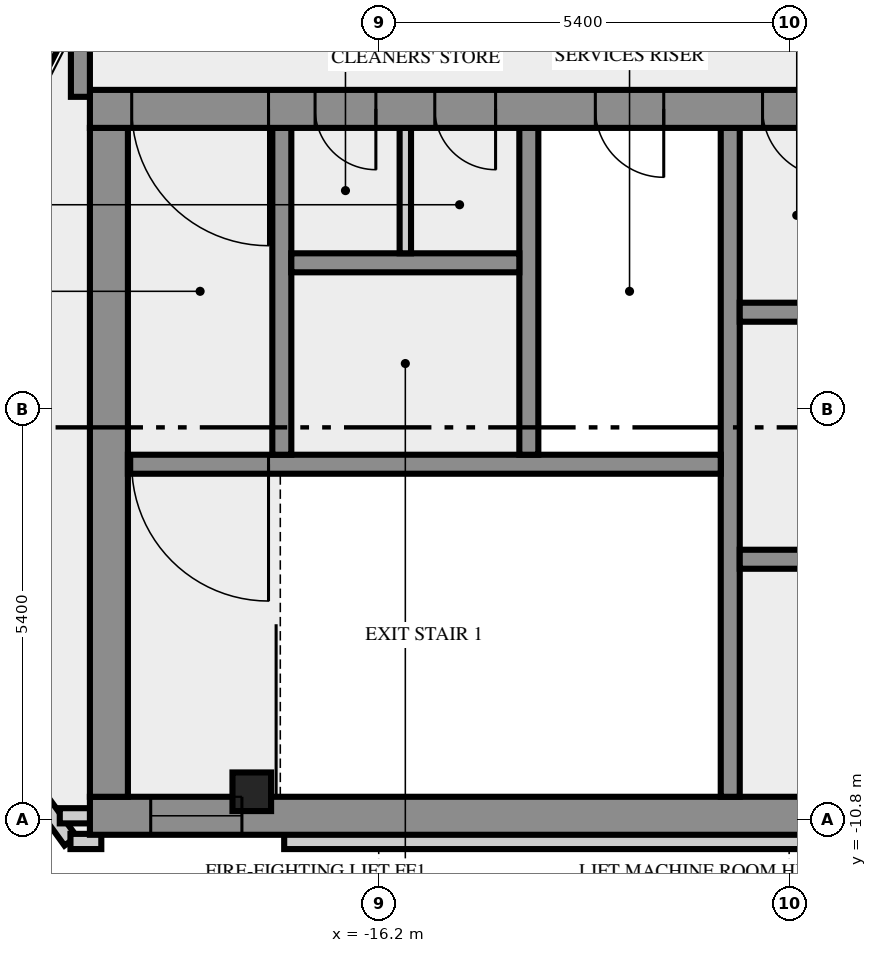
"""IFC4 building model, lengths in metres.
Left out: names, types, materials, properties, quantities, classifications, styles, units other than length and angle.
Written with IfcOpenShell. Run it as: python <this file> out.ifc"""

import sys

from ifc_helpers import new_model, si_unit, direction, frame, frame_2d, origin, origin_2d, place, context, subcontext, project, spatial, rectangle, hollow_rectangle, extrude, element, fill, save


model = new_model("IFC4")
c1 = context("Model", 3, precision=1e-05, world=origin(), true_north=direction((0.0, 1.0)))
c2 = subcontext(c1, "Body", "Model", "MODEL_VIEW")
j1 = project(units=[si_unit("LENGTHUNIT", "METRE"), si_unit("PLANEANGLEUNIT", "RADIAN")], contexts=[c1])
p1 = place(None, origin())
s1 = spatial("IfcSite", under=j1, at=p1, CompositionType="ELEMENT")
p2 = place(p1, origin())
s2 = spatial("IfcBuilding", under=s1, at=p2, CompositionType="ELEMENT")
p3 = place(p2, frame((0.0, 0.0, 363.0)))
s3 = spatial("IfcBuildingStorey", under=s2, at=p3, CompositionType="ELEMENT", Elevation=363.0)
p4 = place(p3, frame((-17.87, -10.434, 0.0), z_axis=(0.0, 0.0, 1.0), x_axis=(1.0, 0.0, 0.0)))
e1 = element("IfcColumn", 1, at=p4, inside=s3, PredefinedType="COLUMN", context=c2, shape_type="SweptSolid", body=[
    extrude(hollow_rectangle(XDim=0.508, YDim=0.508, WallThickness=0.016, at=origin_2d()), origin(), (0.0, 0.0, 1.0), 4.75),
])
p5 = place(p3, frame((-14.748, 10.692, 0.0), z_axis=(0.0, 0.0, 1.0), x_axis=(-0.453989383659, -0.891007092859, 0.0)))
e2 = element("IfcWall", 2, at=p5, inside=s3, PredefinedType="SOLIDWALL", context=c2, shape_type="SweptSolid", body=[
    extrude(rectangle(XDim=20.988, YDim=0.2, at=frame_2d((10.494, 0.0))), origin(), (0.0, 0.0, 1.0), 4.75),
])
p6 = place(p5, frame((1.06, 0.0, 1.0)))
e3 = element("IfcOpeningElement", 3, at=p6, cuts=e2, PredefinedType="OPENING", context=c2, shape_type="SweptSolid", body=[
    extrude(rectangle(XDim=3.0, YDim=2.8, at=frame_2d((1.5, 1.4))), frame((0.0, 0.11, 0.0), z_axis=(0.0, -1.0, 0.0), x_axis=(1.0, 0.0, 0.0)), (0.0, 0.0, 1.0), 0.22),
])
p7 = place(p5, frame((6.428, 0.0, 1.0)))
e4 = element("IfcOpeningElement", 4, at=p7, cuts=e2, PredefinedType="OPENING", context=c2, shape_type="SweptSolid", body=[
    extrude(rectangle(XDim=3.0, YDim=2.8, at=frame_2d((1.5, 1.4))), frame((0.0, 0.11, 0.0), z_axis=(0.0, -1.0, 0.0), x_axis=(1.0, 0.0, 0.0)), (0.0, 0.0, 1.0), 0.22),
])
p8 = place(p5, frame((12.044, 0.0, 1.0)))
e5 = element("IfcOpeningElement", 5, at=p8, cuts=e2, PredefinedType="OPENING", context=c2, shape_type="SweptSolid", body=[
    extrude(rectangle(XDim=3.0, YDim=2.8, at=frame_2d((1.5, 1.4))), frame((0.0, 0.11, 0.0), z_axis=(0.0, -1.0, 0.0), x_axis=(1.0, 0.0, 0.0)), (0.0, 0.0, 1.0), 0.22),
])
p9 = place(p5, frame((17.17, 0.0, 1.0)))
e6 = element("IfcOpeningElement", 6, at=p9, cuts=e2, PredefinedType="OPENING", context=c2, shape_type="SweptSolid", body=[
    extrude(rectangle(XDim=3.0, YDim=2.8, at=frame_2d((1.5, 1.4))), frame((0.0, 0.11, 0.0), z_axis=(0.0, -1.0, 0.0), x_axis=(1.0, 0.0, 0.0)), (0.0, 0.0, 1.0), 0.22),
])
p10 = place(p3, frame((-21.833, -8.909, 0.0), z_axis=(0.0, 0.0, 1.0), x_axis=(0.587766567315, -0.809030569476, 0.0)))
e7 = element("IfcWall", 7, at=p10, inside=s3, PredefinedType="SOLIDWALL", context=c2, shape_type="SweptSolid", body=[
    extrude(rectangle(XDim=2.688, YDim=0.2, at=frame_2d((1.344, 0.0))), origin(), (0.0, 0.0, 1.0), 4.75),
])
p11 = place(p3, frame((-20.256, -11.088, 0.0), z_axis=(0.0, 0.0, 1.0), x_axis=(1.0, 0.0, 0.0)))
e8 = element("IfcWall", 8, at=p11, inside=s3, PredefinedType="SOLIDWALL", context=c2, shape_type="SweptSolid", body=[
    extrude(rectangle(XDim=0.406, YDim=0.2, at=frame_2d((0.203, 0.0))), origin(), (0.0, 0.0, 1.0), 4.75),
])
p12 = place(p3, frame((-17.444, -11.088, 0.0), z_axis=(0.0, 0.0, 1.0), x_axis=(1.0, 0.0, 0.0)))
e9 = element("IfcWall", 9, at=p12, inside=s3, PredefinedType="SOLIDWALL", context=c2, shape_type="SweptSolid", body=[
    extrude(rectangle(XDim=34.888, YDim=0.2, at=frame_2d((17.444, 0.0))), origin(), (0.0, 0.0, 1.0), 4.75),
])
p13 = place(p3, frame((-19.98, -10.75, 0.0), z_axis=(0.0, 0.0, 1.0), x_axis=(-1.0, 0.0, 0.0)))
e10 = element("IfcWall", 10, at=p13, inside=s3, PredefinedType="SOLIDWALL", context=c2, shape_type="SweptSolid", body=[
    extrude(rectangle(XDim=0.417, YDim=0.2, at=frame_2d((0.208, 0.0))), origin(), (0.0, 0.0, 1.0), 4.75),
])
p14 = place(p3, frame((-20.0, -10.75, 0.0), z_axis=(0.0, 0.0, 1.0), x_axis=(1.0, 0.0, 0.0)))
e11 = element("IfcWall", 11, at=p14, inside=s3, PredefinedType="SHEAR", context=c2, shape_type="SweptSolid", body=[
    extrude(rectangle(XDim=40.0, YDim=0.5, at=frame_2d((20.0, 0.0))), origin(), (0.0, 0.0, 1.0), 4.75),
])
p15 = place(p14, frame((0.8, 0.0, 1.0)))
e12 = element("IfcOpeningElement", 12, at=p15, cuts=e11, PredefinedType="OPENING", context=c2, shape_type="SweptSolid", body=[
    extrude(rectangle(XDim=1.2, YDim=1.2, at=frame_2d((0.6, 0.6))), frame((0.0, 0.26, 0.0), z_axis=(0.0, -1.0, 0.0), x_axis=(1.0, 0.0, 0.0)), (0.0, 0.0, 1.0), 0.52),
])
p16 = place(p14, frame((38.0, 0.0, 1.0)))
e13 = element("IfcOpeningElement", 13, at=p16, cuts=e11, PredefinedType="OPENING", context=c2, shape_type="SweptSolid", body=[
    extrude(rectangle(XDim=1.2, YDim=1.2, at=frame_2d((0.6, 0.6))), frame((0.0, 0.26, 0.0), z_axis=(0.0, -1.0, 0.0), x_axis=(1.0, 0.0, 0.0)), (0.0, 0.0, 1.0), 0.52),
])
p17 = place(p3, frame((-19.75, -10.5, 0.0), z_axis=(0.0, 0.0, 1.0), x_axis=(0.0, 1.0, 0.0)))
e14 = element("IfcWall", 14, at=p17, inside=s3, PredefinedType="SHEAR", context=c2, shape_type="SweptSolid", body=[
    extrude(rectangle(XDim=8.8, YDim=0.5, at=frame_2d((4.4, 0.0))), origin(), (0.0, 0.0, 1.0), 4.75),
])
p18 = place(p3, frame((-11.575, -10.5, 0.0), z_axis=(0.0, 0.0, 1.0), x_axis=(0.0, 1.0, 0.0)))
e15 = element("IfcWall", 15, at=p18, inside=s3, PredefinedType="SHEAR", context=c2, shape_type="SweptSolid", body=[
    extrude(rectangle(XDim=8.8, YDim=0.25, at=frame_2d((4.4, 0.0))), origin(), (0.0, 0.0, 1.0), 4.75),
])
p19 = place(p3, frame((-6.3, -7.375, 0.0), z_axis=(0.0, 0.0, 1.0), x_axis=(-1.0, 0.0, 0.0)))
e16 = element("IfcWall", 16, at=p19, inside=s3, PredefinedType="SHEAR", context=c2, shape_type="SweptSolid", body=[
    extrude(rectangle(XDim=5.15, YDim=0.25, at=frame_2d((2.575, 0.0))), origin(), (0.0, 0.0, 1.0), 4.75),
])
p20 = place(p19, frame((2.95, 0.0, 0.0)))
e17 = element("IfcOpeningElement", 17, at=p20, cuts=e16, PredefinedType="OPENING", context=c2, shape_type="SweptSolid", body=[
    extrude(rectangle(XDim=0.9, YDim=2.1, at=frame_2d((0.45, 1.05))), frame((0.0, 0.135, 0.0), z_axis=(0.0, -1.0, 0.0), x_axis=(1.0, 0.0, 0.0)), (0.0, 0.0, 1.0), 0.27),
])
p21 = place(p19, frame((0.25, 0.0, 0.0)))
e18 = element("IfcOpeningElement", 18, at=p21, cuts=e16, PredefinedType="OPENING", context=c2, shape_type="SweptSolid", body=[
    extrude(rectangle(XDim=0.9, YDim=2.1, at=frame_2d((0.45, 1.05))), frame((0.0, 0.135, 0.0), z_axis=(0.0, -1.0, 0.0), x_axis=(1.0, 0.0, 0.0)), (0.0, 0.0, 1.0), 0.27),
])
p22 = place(p3, frame((-11.7, -6.125, 0.0), z_axis=(0.0, 0.0, 1.0), x_axis=(-1.0, 0.0, 0.0)))
e19 = element("IfcWall", 19, at=p22, inside=s3, PredefinedType="SHEAR", context=c2, shape_type="SweptSolid", body=[
    extrude(rectangle(XDim=7.8, YDim=0.25, at=frame_2d((3.9, 0.0))), origin(), (0.0, 0.0, 1.0), 4.75),
])
p23 = place(p22, frame((5.95, 0.0, 0.0)))
e20 = element("IfcOpeningElement", 20, at=p23, cuts=e19, PredefinedType="OPENING", context=c2, shape_type="SweptSolid", body=[
    extrude(rectangle(XDim=1.8, YDim=2.1, at=frame_2d((0.9, 1.05))), frame((0.0, 0.135, 0.0), z_axis=(0.0, -1.0, 0.0), x_axis=(1.0, 0.0, 0.0)), (0.0, 0.0, 1.0), 0.27),
])
for number, where, z_axis, x_axis in (
    (21, (-17.475, -6.0, 0.0), (0.0, 0.0, 1.0), (0.0, 1.0, 0.0)),
    (22, (-14.225, -6.0, 0.0), (0.0, 0.0, 1.0), (0.0, 1.0, 0.0)),
):
    element("IfcWall", number, at=place(p3, frame(where, z_axis=z_axis, x_axis=x_axis)), inside=s3, PredefinedType="SHEAR", context=c2, shape_type="SweptSolid", body=[
        extrude(rectangle(XDim=4.3, YDim=0.25, at=frame_2d((2.15, 0.0))), origin(), (0.0, 0.0, 1.0), 4.75),
    ])
p24 = place(p3, frame((-11.45, -4.125, 0.0), z_axis=(0.0, 0.0, 1.0), x_axis=(1.0, 0.0, 0.0)))
e23 = element("IfcWall", 23, at=p24, inside=s3, PredefinedType="SHEAR", context=c2, shape_type="SweptSolid", body=[
    extrude(rectangle(XDim=1.5, YDim=0.25, at=frame_2d((0.75, 0.0))), origin(), (0.0, 0.0, 1.0), 4.75),
])
p25 = place(p3, frame((-17.35, -3.475, 0.0), z_axis=(0.0, 0.0, 1.0), x_axis=(1.0, 0.0, 0.0)))
e24 = element("IfcWall", 24, at=p25, inside=s3, PredefinedType="SHEAR", context=c2, shape_type="SweptSolid", body=[
    extrude(rectangle(XDim=3.0, YDim=0.25, at=frame_2d((1.5, 0.0))), origin(), (0.0, 0.0, 1.0), 4.75),
])
p26 = place(p3, frame((-15.85, -3.35, 0.0), z_axis=(0.0, 0.0, 1.0), x_axis=(0.0, 1.0, 0.0)))
e25 = element("IfcWall", 25, at=p26, inside=s3, PredefinedType="PARTITIONING", context=c2, shape_type="SweptSolid", body=[
    extrude(rectangle(XDim=1.65, YDim=0.15, at=frame_2d((0.825, 0.0))), origin(), (0.0, 0.0, 1.0), 4.75),
])
p27 = place(p3, frame((20.0, -1.45, 0.0), z_axis=(0.0, 0.0, 1.0), x_axis=(-1.0, 0.0, 0.0)))
e26 = element("IfcWall", 26, at=p27, inside=s3, PredefinedType="SHEAR", context=c2, shape_type="SweptSolid", body=[
    extrude(rectangle(XDim=40.0, YDim=0.5, at=frame_2d((20.0, 0.0))), origin(), (0.0, 0.0, 1.0), 4.75),
])
p28 = place(p27, frame((37.65, 0.0, 0.0)))
e27 = element("IfcOpeningElement", 27, at=p28, cuts=e26, PredefinedType="OPENING", context=c2, shape_type="SweptSolid", body=[
    extrude(rectangle(XDim=1.8, YDim=2.1, at=frame_2d((0.9, 1.05))), frame((0.0, 0.26, 0.0), z_axis=(0.0, -1.0, 0.0), x_axis=(1.0, 0.0, 0.0)), (0.0, 0.0, 1.0), 0.52),
])
p29 = place(p27, frame((36.238, 0.0, 0.0)))
e28 = element("IfcOpeningElement", 28, at=p29, cuts=e26, PredefinedType="OPENING", context=c2, shape_type="SweptSolid", body=[
    extrude(rectangle(XDim=0.8, YDim=2.1, at=frame_2d((0.4, 1.05))), frame((0.0, 0.26, 0.0), z_axis=(0.0, -1.0, 0.0), x_axis=(1.0, 0.0, 0.0)), (0.0, 0.0, 1.0), 0.52),
])
p30 = place(p27, frame((34.663, 0.0, 0.0)))
e29 = element("IfcOpeningElement", 29, at=p30, cuts=e26, PredefinedType="OPENING", context=c2, shape_type="SweptSolid", body=[
    extrude(rectangle(XDim=0.8, YDim=2.1, at=frame_2d((0.4, 1.05))), frame((0.0, 0.26, 0.0), z_axis=(0.0, -1.0, 0.0), x_axis=(1.0, 0.0, 0.0)), (0.0, 0.0, 1.0), 0.52),
])
p31 = place(p27, frame((32.45, 0.0, 0.0)))
e30 = element("IfcOpeningElement", 30, at=p31, cuts=e26, PredefinedType="OPENING", context=c2, shape_type="SweptSolid", body=[
    extrude(rectangle(XDim=0.9, YDim=2.1, at=frame_2d((0.45, 1.05))), frame((0.0, 0.26, 0.0), z_axis=(0.0, -1.0, 0.0), x_axis=(1.0, 0.0, 0.0)), (0.0, 0.0, 1.0), 0.52),
])
p32 = place(p27, frame((30.25, 0.0, 0.0)))
e31 = element("IfcOpeningElement", 31, at=p32, cuts=e26, PredefinedType="OPENING", context=c2, shape_type="SweptSolid", body=[
    extrude(rectangle(XDim=0.9, YDim=2.1, at=frame_2d((0.45, 1.05))), frame((0.0, 0.26, 0.0), z_axis=(0.0, -1.0, 0.0), x_axis=(1.0, 0.0, 0.0)), (0.0, 0.0, 1.0), 0.52),
])
p33 = place(p27, frame((27.1, 0.0, 0.0)))
e32 = element("IfcOpeningElement", 32, at=p33, cuts=e26, PredefinedType="OPENING", context=c2, shape_type="SweptSolid", body=[
    extrude(rectangle(XDim=1.8, YDim=2.1, at=frame_2d((0.9, 1.05))), frame((0.0, 0.26, 0.0), z_axis=(0.0, -1.0, 0.0), x_axis=(1.0, 0.0, 0.0)), (0.0, 0.0, 1.0), 0.52),
])
p34 = place(p27, frame((13.5, 0.0, 0.0)))
e33 = element("IfcOpeningElement", 33, at=p34, cuts=e26, PredefinedType="OPENING", context=c2, shape_type="SweptSolid", body=[
    extrude(rectangle(XDim=0.9, YDim=2.1, at=frame_2d((0.45, 1.05))), frame((0.0, 0.26, 0.0), z_axis=(0.0, -1.0, 0.0), x_axis=(1.0, 0.0, 0.0)), (0.0, 0.0, 1.0), 0.52),
])
p35 = place(p27, frame((9.275, 0.0, 0.0)))
e34 = element("IfcOpeningElement", 34, at=p35, cuts=e26, PredefinedType="OPENING", context=c2, shape_type="SweptSolid", body=[
    extrude(rectangle(XDim=2.0, YDim=2.1, at=frame_2d((1.0, 1.05))), frame((0.0, 0.26, 0.0), z_axis=(0.0, -1.0, 0.0), x_axis=(1.0, 0.0, 0.0)), (0.0, 0.0, 1.0), 0.52),
])
p36 = place(p27, frame((6.65, 0.0, 0.0)))
e35 = element("IfcOpeningElement", 35, at=p36, cuts=e26, PredefinedType="OPENING", context=c2, shape_type="SweptSolid", body=[
    extrude(rectangle(XDim=0.9, YDim=2.1, at=frame_2d((0.45, 1.05))), frame((0.0, 0.26, 0.0), z_axis=(0.0, -1.0, 0.0), x_axis=(1.0, 0.0, 0.0)), (0.0, 0.0, 1.0), 0.52),
])
p37 = place(p27, frame((3.7, 0.0, 0.0)))
e36 = element("IfcOpeningElement", 36, at=p37, cuts=e26, PredefinedType="OPENING", context=c2, shape_type="SweptSolid", body=[
    extrude(rectangle(XDim=0.9, YDim=2.1, at=frame_2d((0.45, 1.05))), frame((0.0, 0.26, 0.0), z_axis=(0.0, -1.0, 0.0), x_axis=(1.0, 0.0, 0.0)), (0.0, 0.0, 1.0), 0.52),
])
p38 = place(p27, frame((0.55, 0.0, 0.0)))
e37 = element("IfcOpeningElement", 37, at=p38, cuts=e26, PredefinedType="OPENING", context=c2, shape_type="SweptSolid", body=[
    extrude(rectangle(XDim=1.8, YDim=2.1, at=frame_2d((0.9, 1.05))), frame((0.0, 0.26, 0.0), z_axis=(0.0, -1.0, 0.0), x_axis=(1.0, 0.0, 0.0)), (0.0, 0.0, 1.0), 0.52),
])
p39 = place(p3, frame((-20.125, -1.291, 0.0), z_axis=(0.0, 0.0, 1.0), x_axis=(0.0, 1.0, 0.0)))
e38 = element("IfcWall", 38, at=p39, inside=s3, PredefinedType="SOLIDWALL", context=c2, shape_type="SweptSolid", body=[
    extrude(rectangle(XDim=0.921, YDim=0.25, at=frame_2d((0.46, 0.0))), origin(), (0.0, 0.0, 1.0), 4.05),
])
p40 = place(p8, origin())
e39 = element("IfcWindow", 39, at=p40, inside=s3, PartitioningType="SINGLE_PANEL", PredefinedType="WINDOW", context=c2, shape_type="SweptSolid", body=[
    extrude(rectangle(XDim=3.0, YDim=2.8, at=frame_2d((1.5, 1.4))), frame((0.0, 0.03, 0.0), z_axis=(0.0, -1.0, 0.0), x_axis=(1.0, 0.0, 0.0)), (0.0, 0.0, 1.0), 0.06),
])
fill(e5, e39)
p41 = place(p15, origin())
e40 = element("IfcWindow", 40, at=p41, inside=s3, PartitioningType="SINGLE_PANEL", PredefinedType="WINDOW", context=c2, shape_type="SweptSolid", body=[
    extrude(rectangle(XDim=1.2, YDim=1.2, at=frame_2d((0.6, 0.6))), frame((0.0, 0.03, 0.0), z_axis=(0.0, -1.0, 0.0), x_axis=(1.0, 0.0, 0.0)), (0.0, 0.0, 1.0), 0.06),
])
fill(e12, e40)
p42 = place(p23, origin())
e41 = element("IfcDoor", 41, at=p42, inside=s3, OperationType="DOUBLE_DOOR_SINGLE_SWING", PredefinedType="DOOR", context=c2, shape_type="SweptSolid", body=[
    extrude(rectangle(XDim=1.8, YDim=2.1, at=frame_2d((0.9, 1.05))), frame((0.0, 0.025, 0.0), z_axis=(0.0, -1.0, 0.0), x_axis=(1.0, 0.0, 0.0)), (0.0, 0.0, 1.0), 0.05),
])
fill(e20, e41)
p43 = place(p28, origin())
e42 = element("IfcDoor", 42, at=p43, inside=s3, OperationType="DOUBLE_DOOR_SINGLE_SWING", PredefinedType="DOOR", context=c2, shape_type="SweptSolid", body=[
    extrude(rectangle(XDim=1.8, YDim=2.1, at=frame_2d((0.9, 1.05))), frame((0.0, 0.025, 0.0), z_axis=(0.0, -1.0, 0.0), x_axis=(1.0, 0.0, 0.0)), (0.0, 0.0, 1.0), 0.05),
])
fill(e27, e42)
p44 = place(p29, origin())
e43 = element("IfcDoor", 43, at=p44, inside=s3, OperationType="SINGLE_SWING_RIGHT", PredefinedType="DOOR", context=c2, shape_type="SweptSolid", body=[
    extrude(rectangle(XDim=0.8, YDim=2.1, at=frame_2d((0.4, 1.05))), frame((0.0, 0.025, 0.0), z_axis=(0.0, -1.0, 0.0), x_axis=(1.0, 0.0, 0.0)), (0.0, 0.0, 1.0), 0.05),
])
fill(e28, e43)
p45 = place(p30, origin())
e44 = element("IfcDoor", 44, at=p45, inside=s3, OperationType="SINGLE_SWING_RIGHT", PredefinedType="DOOR", context=c2, shape_type="SweptSolid", body=[
    extrude(rectangle(XDim=0.8, YDim=2.1, at=frame_2d((0.4, 1.05))), frame((0.0, 0.025, 0.0), z_axis=(0.0, -1.0, 0.0), x_axis=(1.0, 0.0, 0.0)), (0.0, 0.0, 1.0), 0.05),
])
fill(e29, e44)
p46 = place(p31, origin())
e45 = element("IfcDoor", 45, at=p46, inside=s3, OperationType="SINGLE_SWING_RIGHT", PredefinedType="DOOR", context=c2, shape_type="SweptSolid", body=[
    extrude(rectangle(XDim=0.9, YDim=2.1, at=frame_2d((0.45, 1.05))), frame((0.0, 0.025, 0.0), z_axis=(0.0, -1.0, 0.0), x_axis=(1.0, 0.0, 0.0)), (0.0, 0.0, 1.0), 0.05),
])
fill(e30, e45)
p47 = place(p32, origin())
e46 = element("IfcDoor", 46, at=p47, inside=s3, OperationType="SINGLE_SWING_RIGHT", PredefinedType="DOOR", context=c2, shape_type="SweptSolid", body=[
    extrude(rectangle(XDim=0.9, YDim=2.1, at=frame_2d((0.45, 1.05))), frame((0.0, 0.025, 0.0), z_axis=(0.0, -1.0, 0.0), x_axis=(1.0, 0.0, 0.0)), (0.0, 0.0, 1.0), 0.05),
])
fill(e31, e46)
save(model, sys.argv[1])
